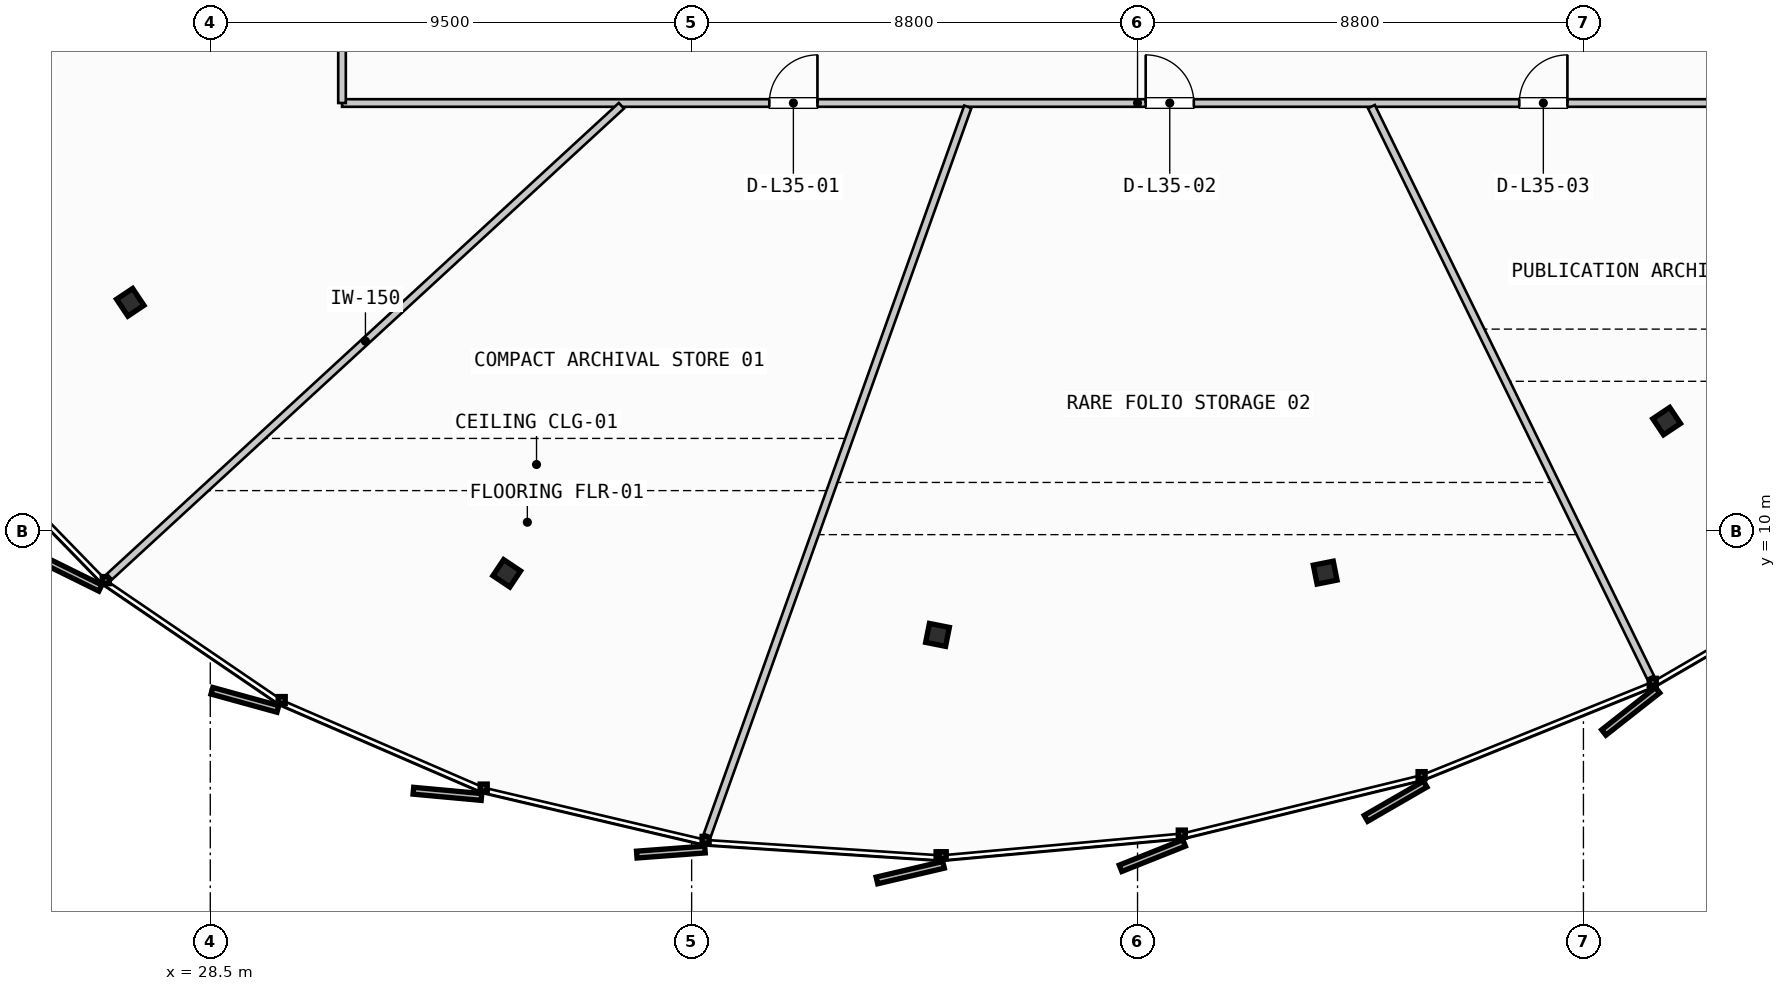
"""IFC4 building model, lengths in metres.
Left out: names, types, materials, properties, quantities, classifications, styles, units other than length and angle.
Written with IfcOpenShell. Run it as: python <this file> out.ifc"""

import sys

from ifc_helpers import new_model, si_unit, direction, frame, frame_2d, origin, origin_2d, place, context, subcontext, project, spatial, rectangle, i_section, extrude, source, transform, mapped, element, fill, save


model = new_model("IFC4")
c1 = context("Model", 3, precision=1e-05, world=origin(), true_north=direction((0.0, 1.0)))
c2 = subcontext(c1, "Body", "Model", "MODEL_VIEW")
j1 = project(units=[si_unit("LENGTHUNIT", "METRE"), si_unit("PLANEANGLEUNIT", "RADIAN")], contexts=[c1])
p1 = place(None, origin())
s1 = spatial("IfcSite", under=j1, at=p1, CompositionType="ELEMENT")
p2 = place(p1, origin())
s2 = spatial("IfcBuilding", under=s1, at=p2, CompositionType="ELEMENT")
p3 = place(p2, frame((0.0, 0.0, 139.45)))
s3 = spatial("IfcBuildingStorey", under=s2, at=p3, CompositionType="ELEMENT", Elevation=139.45)
m1 = source(origin(), c2, "Body", "SweptSolid", [
    extrude(i_section(OverallWidth=0.401, OverallDepth=0.381, WebThickness=0.032, FlangeThickness=0.051, FilletRadius=0.015, at=origin_2d()), origin(), (0.0, 0.0, 1.0), 3.3),
])
for number, where, z_axis, x_axis in (
    (1, (26.921, 14.517, 0.0), (0.0, 0.0, 1.0), (-0.831, -0.556, 0.0)),
    (2, (34.351, 9.168, 0.0), (0.0, 0.0, 1.0), (-0.556, -0.831, 0.0)),
    (3, (42.852, 7.954, 0.0), (0.0, 0.0, 1.0), (-0.195, -0.981, 0.0)),
    (4, (50.503, 9.182, 0.0), (0.0, 0.0, 1.0), (0.195, -0.981, 0.0)),
    (5, (57.242, 12.172, 0.0), (0.0, 0.0, 1.0), (0.556, -0.831, 0.0)),
):
    element("IfcColumn", number, at=place(p3, frame(where, z_axis=z_axis, x_axis=x_axis)), inside=s3, PredefinedType="COLUMN", context=c2, shape_type="MappedRepresentation", body=[
        mapped(m1, transform((0.0, 0.0, 0.0), scale=1.0)),
    ])
p4 = place(p3, frame((31.1, 18.45, 0.0), z_axis=(0.0, 0.0, 1.0), x_axis=(1.0, 0.0, 0.0)))
e6 = element("IfcWall", 6, at=p4, inside=s3, PredefinedType="PARTITIONING", context=c2, shape_type="SweptSolid", body=[
    extrude(rectangle(XDim=31.4, YDim=0.15, at=frame_2d((15.7, 0.0))), origin(), (0.0, 0.0, 1.0), 2.305),
])
p5 = place(p4, frame((8.433, 0.0, 0.0)))
e7 = element("IfcOpeningElement", 7, at=p5, cuts=e6, PredefinedType="OPENING", context=c2, shape_type="SweptSolid", body=[
    extrude(rectangle(XDim=0.95, YDim=2.15, at=frame_2d((0.475, 1.075))), frame((0.0, 0.085, 0.0), z_axis=(0.0, -1.0, 0.0), x_axis=(1.0, 0.0, 0.0)), (0.0, 0.0, 1.0), 0.17),
])
p6 = place(p4, frame((15.861, 0.0, 0.0)))
e8 = element("IfcOpeningElement", 8, at=p6, cuts=e6, PredefinedType="OPENING", context=c2, shape_type="SweptSolid", body=[
    extrude(rectangle(XDim=0.95, YDim=2.15, at=frame_2d((0.475, 1.075))), frame((0.0, 0.085, 0.0), z_axis=(0.0, -1.0, 0.0), x_axis=(1.0, 0.0, 0.0)), (0.0, 0.0, 1.0), 0.17),
])
p7 = place(p4, frame((23.234, 0.0, 0.0)))
e9 = element("IfcOpeningElement", 9, at=p7, cuts=e6, PredefinedType="OPENING", context=c2, shape_type="SweptSolid", body=[
    extrude(rectangle(XDim=0.95, YDim=2.15, at=frame_2d((0.475, 1.075))), frame((0.0, 0.085, 0.0), z_axis=(0.0, -1.0, 0.0), x_axis=(1.0, 0.0, 0.0)), (0.0, 0.0, 1.0), 0.17),
])
p8 = place(p4, frame((28.424, 0.0, 0.0)))
e10 = element("IfcOpeningElement", 10, at=p8, cuts=e6, PredefinedType="OPENING", context=c2, shape_type="SweptSolid", body=[
    extrude(rectangle(XDim=0.95, YDim=2.15, at=frame_2d((0.475, 1.075))), frame((0.0, 0.085, 0.0), z_axis=(0.0, -1.0, 0.0), x_axis=(1.0, 0.0, 0.0)), (0.0, 0.0, 1.0), 0.17),
])
p9 = place(p3, frame((31.1, 20.15, 0.0), z_axis=(0.0, 0.0, 1.0), x_axis=(0.0, -1.0, 0.0)))
e11 = element("IfcWall", 11, at=p9, inside=s3, PredefinedType="PARTITIONING", context=c2, shape_type="SweptSolid", body=[
    extrude(rectangle(XDim=1.7, YDim=0.15, at=frame_2d((0.85, 0.0))), origin(), (0.0, 0.0, 1.0), 2.305),
])
p10 = place(p3, frame((36.614, 18.396, 0.0), z_axis=(0.0, 0.0, 1.0), x_axis=(-0.735962913831, -0.677021853019, 0.0)))
e12 = element("IfcWall", 12, at=p10, inside=s3, PredefinedType="PARTITIONING", context=c2, shape_type="SweptSolid", body=[
    extrude(rectangle(XDim=13.727, YDim=0.15, at=frame_2d((6.864, 0.0))), origin(), (0.0, 0.0, 1.0), 2.305),
])
p11 = place(p3, frame((43.45, 18.375, 0.0), z_axis=(0.0, 0.0, 1.0), x_axis=(-0.336737591422, -0.9415985315, 0.0)))
e13 = element("IfcWall", 13, at=p11, inside=s3, PredefinedType="PARTITIONING", context=c2, shape_type="SweptSolid", body=[
    extrude(rectangle(XDim=15.264, YDim=0.15, at=frame_2d((7.632, 0.0))), origin(), (0.0, 0.0, 1.0), 2.305),
])
p12 = place(p3, frame((51.416, 18.378, 0.0), z_axis=(0.0, 0.0, 1.0), x_axis=(0.439375681954, -0.898303406488, 0.0)))
e14 = element("IfcWall", 14, at=p12, inside=s3, PredefinedType="PARTITIONING", context=c2, shape_type="SweptSolid", body=[
    extrude(rectangle(XDim=12.537, YDim=0.15, at=frame_2d((6.268, 0.0))), origin(), (0.0, 0.0, 1.0), 2.305),
])
m2 = source(origin(), c2, "Body", "SweptSolid", [
    extrude(rectangle(XDim=0.95, YDim=2.15, at=frame_2d((0.475, 1.075))), frame((0.0, 0.025, 0.0), z_axis=(0.0, -1.0, 0.0), x_axis=(1.0, 0.0, 0.0)), (0.0, 0.0, 1.0), 0.05),
])
p13 = place(p5, origin())
e15 = element("IfcDoor", 15, at=p13, inside=s3, OperationType="SINGLE_SWING_RIGHT", PredefinedType="DOOR", context=c2, shape_type="MappedRepresentation", body=[
    mapped(m2, transform((0.0, 0.0, 0.0), scale=1.0)),
])
fill(e7, e15)
p14 = place(p6, origin())
e16 = element("IfcDoor", 16, at=p14, inside=s3, OperationType="SINGLE_SWING_LEFT", PredefinedType="DOOR", context=c2, shape_type="MappedRepresentation", body=[
    mapped(m2, transform((0.0, 0.0, 0.0), scale=1.0)),
])
fill(e8, e16)
p15 = place(p7, origin())
e17 = element("IfcDoor", 17, at=p15, inside=s3, OperationType="SINGLE_SWING_RIGHT", PredefinedType="DOOR", context=c2, shape_type="MappedRepresentation", body=[
    mapped(m2, transform((0.0, 0.0, 0.0), scale=1.0)),
])
fill(e9, e17)
save(model, sys.argv[1])
